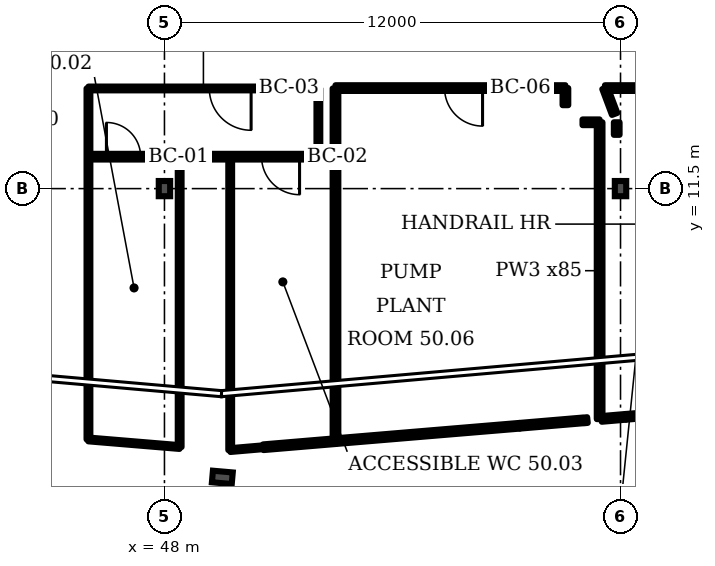
"""IFC4 building model, lengths in metres.
Left out: names, types, materials, properties, quantities, classifications, styles, units other than length and angle.
Written with IfcOpenShell. Run it as: python <this file> out.ifc"""

import sys

from ifc_helpers import new_model, si_unit, direction, frame, frame_2d, origin, origin_2d, place, context, subcontext, project, spatial, rectangle, i_section, extrude, element, fill, save


model = new_model("IFC4")
c1 = context("Model", 3, precision=1e-05, world=origin(), true_north=direction((0.0, 1.0)))
c2 = subcontext(c1, "Body", "Model", "MODEL_VIEW")
j1 = project(units=[si_unit("LENGTHUNIT", "METRE"), si_unit("PLANEANGLEUNIT", "RADIAN")], contexts=[c1])
p1 = place(None, origin())
s1 = spatial("IfcSite", under=j1, at=p1, CompositionType="ELEMENT")
p2 = place(p1, origin())
s2 = spatial("IfcBuilding", under=s1, at=p2, CompositionType="ELEMENT")
p3 = place(p2, frame((0.0, 0.0, 202.3)))
s3 = spatial("IfcBuildingStorey", under=s2, at=p3, CompositionType="ELEMENT", Elevation=202.3)
p4 = place(p3, frame((49.523, 3.902, 0.0), z_axis=(0.0, 0.0, 1.0), x_axis=(-0.087156, -0.996197, 0.0)))
e1 = element("IfcColumn", 1, at=p4, inside=s3, PredefinedType="COLUMN", context=c2, shape_type="SweptSolid", body=[
    extrude(i_section(OverallWidth=0.306, OverallDepth=0.524, WebThickness=0.021, FlangeThickness=0.04, FilletRadius=0.027, at=origin_2d()), origin(), (0.0, 0.0, 1.0), 4.8),
])
for number, where, z_axis, x_axis in (
    (2, (48.0, 11.5, 0.0), (0.0, 0.0, 1.0), (1.0, 0.0, 0.0)),
    (3, (60.0, 11.5, 0.0), (0.0, 0.0, 1.0), (1.0, 0.0, 0.0)),
):
    element("IfcColumn", number, at=place(p3, frame(where, z_axis=z_axis, x_axis=x_axis)), inside=s3, PredefinedType="COLUMN", context=c2, shape_type="SweptSolid", body=[
        extrude(i_section(OverallWidth=0.3, OverallDepth=0.4, WebThickness=0.013, FlangeThickness=0.024, FilletRadius=0.027, at=origin_2d()), origin(), (0.0, 0.0, 1.0), 4.8),
    ])
p5 = place(p3, frame((46.0, 4.9, 0.0), z_axis=(0.0, 0.0, 1.0), x_axis=(0.0, 1.0, 0.0)))
e4 = element("IfcWall", 4, at=p5, inside=s3, PredefinedType="PARTITIONING", context=c2, shape_type="SweptSolid", body=[
    extrude(rectangle(XDim=9.235, YDim=0.1, at=frame_2d((4.618, 0.0))), origin(), (0.0, 0.0, 1.0), 4.4),
])
p6 = place(p3, frame((46.0, 12.34, 0.0), z_axis=(0.0, 0.0, 1.0), x_axis=(1.0, 0.0, 0.0)))
e5 = element("IfcWall", 5, at=p6, inside=s3, PredefinedType="PARTITIONING", context=c2, shape_type="SweptSolid", body=[
    extrude(rectangle(XDim=6.5, YDim=0.15, at=frame_2d((3.25, 0.0))), origin(), (0.0, 0.0, 1.0), 4.4),
])
p7 = place(p6, frame((0.473, 0.0, 0.0)))
e6 = element("IfcOpeningElement", 6, at=p7, cuts=e5, PredefinedType="OPENING", context=c2, shape_type="SweptSolid", body=[
    extrude(rectangle(XDim=0.9, YDim=2.1, at=frame_2d((0.45, 1.05))), frame((0.0, 0.085, 0.0), z_axis=(0.0, -1.0, 0.0), x_axis=(1.0, 0.0, 0.0)), (0.0, 0.0, 1.0), 0.17),
])
p8 = place(p6, frame((4.555, 0.0, 0.0)))
e7 = element("IfcOpeningElement", 7, at=p8, cuts=e5, PredefinedType="OPENING", context=c2, shape_type="SweptSolid", body=[
    extrude(rectangle(XDim=1.0, YDim=2.1, at=frame_2d((0.5, 1.05))), frame((0.0, 0.085, 0.0), z_axis=(0.0, -1.0, 0.0), x_axis=(1.0, 0.0, 0.0)), (0.0, 0.0, 1.0), 0.17),
])
p9 = place(p3, frame((46.0, 14.135, 0.0), z_axis=(0.0, 0.0, 1.0), x_axis=(1.0, 0.0, 0.0)))
e8 = element("IfcWall", 8, at=p9, inside=s3, PredefinedType="PARTITIONING", context=c2, shape_type="SweptSolid", body=[
    extrude(rectangle(XDim=6.05, YDim=0.1, at=frame_2d((3.025, 0.0))), origin(), (0.0, 0.0, 1.0), 4.4),
])
p10 = place(p9, frame((3.18, 0.0, 0.0)))
e9 = element("IfcOpeningElement", 9, at=p10, cuts=e8, PredefinedType="OPENING", context=c2, shape_type="SweptSolid", body=[
    extrude(rectangle(XDim=1.1, YDim=2.1, at=frame_2d((0.55, 1.05))), frame((0.0, 0.06, 0.0), z_axis=(0.0, -1.0, 0.0), x_axis=(1.0, 0.0, 0.0)), (0.0, 0.0, 1.0), 0.12),
])
p11 = place(p3, frame((48.4, 4.7, 0.0), z_axis=(0.0, 0.0, 1.0), x_axis=(-0.996551, 0.083029, 0.0)))
e10 = element("IfcWall", 10, at=p11, inside=s3, PredefinedType="PARTITIONING", context=c2, shape_type="SweptSolid", body=[
    extrude(rectangle(XDim=2.408, YDim=0.1, at=frame_2d((1.204, 0.0))), origin(), (0.0, 0.0, 1.0), 4.4),
])
p12 = place(p3, frame((48.4, 4.7, 0.0), z_axis=(0.0, 0.0, 1.0), x_axis=(0.0, 1.0, 0.0)))
e11 = element("IfcWall", 11, at=p12, inside=s3, PredefinedType="PARTITIONING", context=c2, shape_type="SweptSolid", body=[
    extrude(rectangle(XDim=7.64, YDim=0.1, at=frame_2d((3.82, 0.0))), origin(), (0.0, 0.0, 1.0), 4.4),
])
p13 = place(p3, frame((49.73, 4.62, 0.0), z_axis=(0.0, 0.0, 1.0), x_axis=(0.996307, 0.085821, 0.0)))
e12 = element("IfcWall", 12, at=p13, inside=s3, PredefinedType="PARTITIONING", context=c2, shape_type="SweptSolid", body=[
    extrude(rectangle(XDim=0.873, YDim=0.1, at=frame_2d((0.437, 0.0))), origin(), (0.0, 0.0, 1.0), 4.4),
])
p14 = place(p3, frame((49.73, 4.62, 0.0), z_axis=(0.0, 0.0, 1.0), x_axis=(0.0, 1.0, 0.0)))
e13 = element("IfcWall", 13, at=p14, inside=s3, PredefinedType="PARTITIONING", context=c2, shape_type="SweptSolid", body=[
    extrude(rectangle(XDim=7.72, YDim=0.1, at=frame_2d((3.86, 0.0))), origin(), (0.0, 0.0, 1.0), 4.4),
])
p15 = place(p3, frame((50.6, 4.695, 0.0), z_axis=(0.0, 0.0, 1.0), x_axis=(0.996476, 0.083872, 0.0)))
e14 = element("IfcWall", 14, at=p15, inside=s3, PredefinedType="PARTITIONING", context=c2, shape_type="SweptSolid", body=[
    extrude(rectangle(XDim=1.907, YDim=0.15, at=frame_2d((0.953, 0.0))), origin(), (0.0, 0.0, 1.0), 4.4),
])
p16 = place(p3, frame((52.05, 12.345, 0.0), z_axis=(0.0, 0.0, 1.0), x_axis=(0.0, 1.0, 0.0)))
e15 = element("IfcWall", 15, at=p16, inside=s3, PredefinedType="PARTITIONING", context=c2, shape_type="SweptSolid", body=[
    extrude(rectangle(XDim=1.79, YDim=0.1, at=frame_2d((0.895, 0.0))), origin(), (0.0, 0.0, 1.0), 4.4),
])
p17 = place(p3, frame((52.5, 4.855, 0.0), z_axis=(0.0, 0.0, 1.0), x_axis=(0.0, 1.0, 0.0)))
e16 = element("IfcWall", 16, at=p17, inside=s3, PredefinedType="PARTITIONING", context=c2, shape_type="SweptSolid", body=[
    extrude(rectangle(XDim=9.28, YDim=0.15, at=frame_2d((4.64, 0.0))), origin(), (0.0, 0.0, 1.0), 4.4),
])
p18 = place(p3, frame((52.5, 4.855, 0.0), z_axis=(0.0, 0.0, 1.0), x_axis=(0.99652, 0.083307, 0.0)))
e17 = element("IfcWall", 17, at=p18, inside=s3, PredefinedType="PARTITIONING", context=c2, shape_type="SweptSolid", body=[
    extrude(rectangle(XDim=4.862, YDim=0.15, at=frame_2d((2.431, 0.0))), origin(), (0.0, 0.0, 1.0), 4.4),
])
p19 = place(p3, frame((52.5, 14.145, 0.0), z_axis=(0.0, 0.0, 1.0), x_axis=(1.0, 0.0, 0.0)))
e18 = element("IfcWall", 18, at=p19, inside=s3, PredefinedType="PARTITIONING", context=c2, shape_type="SweptSolid", body=[
    extrude(rectangle(XDim=6.05, YDim=0.15, at=frame_2d((3.025, 0.0))), origin(), (0.0, 0.0, 1.0), 4.4),
])
p20 = place(p19, frame((2.87, 0.0, 0.0)))
e19 = element("IfcOpeningElement", 19, at=p20, cuts=e18, PredefinedType="OPENING", context=c2, shape_type="SweptSolid", body=[
    extrude(rectangle(XDim=1.0, YDim=2.1, at=frame_2d((0.5, 1.05))), frame((0.0, 0.085, 0.0), z_axis=(0.0, -1.0, 0.0), x_axis=(1.0, 0.0, 0.0)), (0.0, 0.0, 1.0), 0.17),
])
p21 = place(p3, frame((57.345, 5.26, 0.0), z_axis=(0.0, 0.0, 1.0), x_axis=(0.996443, 0.084225, 0.0)))
e20 = element("IfcWall", 20, at=p21, inside=s3, PredefinedType="PARTITIONING", context=c2, shape_type="SweptSolid", body=[
    extrude(rectangle(XDim=1.661, YDim=0.15, at=frame_2d((0.831, 0.0))), origin(), (0.0, 0.0, 1.0), 4.4),
])
for number, where, z_axis, x_axis in (
    (21, (58.55, 13.695, 0.0), (0.0, 0.0, 1.0), (0.0, 1.0, 0.0)),
    (22, (59.0, 13.245, 0.0), (0.0, 0.0, 1.0), (1.0, 0.0, 0.0)),
):
    element("IfcWall", number, at=place(p3, frame(where, z_axis=z_axis, x_axis=x_axis)), inside=s3, PredefinedType="PARTITIONING", context=c2, shape_type="SweptSolid", body=[
        extrude(rectangle(XDim=0.45, YDim=0.15, at=frame_2d((0.225, 0.0))), origin(), (0.0, 0.0, 1.0), 4.4),
    ])
p22 = place(p3, frame((59.03, 5.4, 0.0), z_axis=(0.0, 0.0, 1.0), x_axis=(0.995017, 0.099745, 0.0)))
e23 = element("IfcWall", 23, at=p22, inside=s3, PredefinedType="PARTITIONING", context=c2, shape_type="SweptSolid", body=[
    extrude(rectangle(XDim=0.1, YDim=0.15, at=frame_2d((0.05, 0.0))), origin(), (0.0, 0.0, 1.0), 4.4),
])
p23 = place(p3, frame((59.45, 5.435, 0.0), z_axis=(0.0, 0.0, 1.0), x_axis=(0.0, 1.0, 0.0)))
e24 = element("IfcWall", 24, at=p23, inside=s3, PredefinedType="PARTITIONING", context=c2, shape_type="SweptSolid", body=[
    extrude(rectangle(XDim=7.81, YDim=0.15, at=frame_2d((3.905, 0.0))), origin(), (0.0, 0.0, 1.0), 4.4),
])
p24 = place(p3, frame((59.5, 5.44, 0.0), z_axis=(0.0, 0.0, 1.0), x_axis=(0.996305, 0.085908, 0.0)))
e25 = element("IfcWall", 25, at=p24, inside=s3, PredefinedType="PARTITIONING", context=c2, shape_type="SweptSolid", body=[
    extrude(rectangle(XDim=0.642, YDim=0.15, at=frame_2d((0.321, 0.0))), origin(), (0.0, 0.0, 1.0), 4.4),
])
p25 = place(p3, frame((59.59, 14.145, 0.0), z_axis=(0.0, 0.0, 1.0), x_axis=(1.0, 0.0, 0.0)))
e26 = element("IfcWall", 26, at=p25, inside=s3, PredefinedType="PARTITIONING", context=c2, shape_type="SweptSolid", body=[
    extrude(rectangle(XDim=4.176, YDim=0.15, at=frame_2d((2.088, 0.0))), origin(), (0.0, 0.0, 1.0), 4.4),
])
p26 = place(p25, frame((1.615, 0.0, 0.0)))
e27 = element("IfcOpeningElement", 27, at=p26, cuts=e26, PredefinedType="OPENING", context=c2, shape_type="SweptSolid", body=[
    extrude(rectangle(XDim=1.0, YDim=2.1, at=frame_2d((0.5, 1.05))), frame((0.0, 0.085, 0.0), z_axis=(0.0, -1.0, 0.0), x_axis=(1.0, 0.0, 0.0)), (0.0, 0.0, 1.0), 0.17),
])
p27 = place(p3, frame((59.845, 13.465, 0.0), z_axis=(0.0, 0.0, 1.0), x_axis=(-0.351013, 0.936371, 0.0)))
e28 = element("IfcWall", 28, at=p27, inside=s3, PredefinedType="PARTITIONING", context=c2, shape_type="SweptSolid", body=[
    extrude(rectangle(XDim=0.726, YDim=0.15, at=frame_2d((0.363, 0.0))), origin(), (0.0, 0.0, 1.0), 4.4),
])
p28 = place(p3, frame((59.9, 12.915, 0.0), z_axis=(0.0, 0.0, 1.0), x_axis=(0.0, 1.0, 0.0)))
e29 = element("IfcWall", 29, at=p28, inside=s3, PredefinedType="PARTITIONING", context=c2, shape_type="SweptSolid", body=[
    extrude(rectangle(XDim=0.33, YDim=0.15, at=frame_2d((0.165, 0.0))), origin(), (0.0, 0.0, 1.0), 4.4),
])
p29 = place(p3, frame((60.14, 5.495, 0.0), z_axis=(0.0, 0.0, 1.0), x_axis=(0.996753, 0.080569, 0.0)))
e30 = element("IfcWall", 30, at=p29, inside=s3, PredefinedType="PARTITIONING", context=c2, shape_type="SweptSolid", body=[
    extrude(rectangle(XDim=0.742, YDim=0.15, at=frame_2d((0.371, 0.0))), origin(), (0.0, 0.0, 1.0), 4.4),
])
p30 = place(p7, origin())
e31 = element("IfcDoor", 31, at=p30, inside=s3, OperationType="SINGLE_SWING_LEFT", PredefinedType="DOOR", context=c2, shape_type="SweptSolid", body=[
    extrude(rectangle(XDim=0.9, YDim=2.1, at=frame_2d((0.45, 1.05))), frame((0.0, 0.025, 0.0), z_axis=(0.0, -1.0, 0.0), x_axis=(1.0, 0.0, 0.0)), (0.0, 0.0, 1.0), 0.05),
])
fill(e6, e31)
p31 = place(p8, origin())
e32 = element("IfcDoor", 32, at=p31, inside=s3, OperationType="SINGLE_SWING_RIGHT", PredefinedType="DOOR", context=c2, shape_type="SweptSolid", body=[
    extrude(rectangle(XDim=1.0, YDim=2.1, at=frame_2d((0.5, 1.05))), frame((0.0, 0.025, 0.0), z_axis=(0.0, -1.0, 0.0), x_axis=(1.0, 0.0, 0.0)), (0.0, 0.0, 1.0), 0.05),
])
fill(e7, e32)
p32 = place(p10, origin())
e33 = element("IfcDoor", 33, at=p32, inside=s3, OperationType="SINGLE_SWING_RIGHT", PredefinedType="DOOR", context=c2, shape_type="SweptSolid", body=[
    extrude(rectangle(XDim=1.1, YDim=2.1, at=frame_2d((0.55, 1.05))), frame((0.0, 0.025, 0.0), z_axis=(0.0, -1.0, 0.0), x_axis=(1.0, 0.0, 0.0)), (0.0, 0.0, 1.0), 0.05),
])
fill(e9, e33)
p33 = place(p20, origin())
e34 = element("IfcDoor", 34, at=p33, inside=s3, OperationType="SINGLE_SWING_RIGHT", PredefinedType="DOOR", context=c2, shape_type="SweptSolid", body=[
    extrude(rectangle(XDim=1.0, YDim=2.1, at=frame_2d((0.5, 1.05))), frame((0.0, 0.025, 0.0), z_axis=(0.0, -1.0, 0.0), x_axis=(1.0, 0.0, 0.0)), (0.0, 0.0, 1.0), 0.05),
])
fill(e19, e34)
save(model, sys.argv[1])
